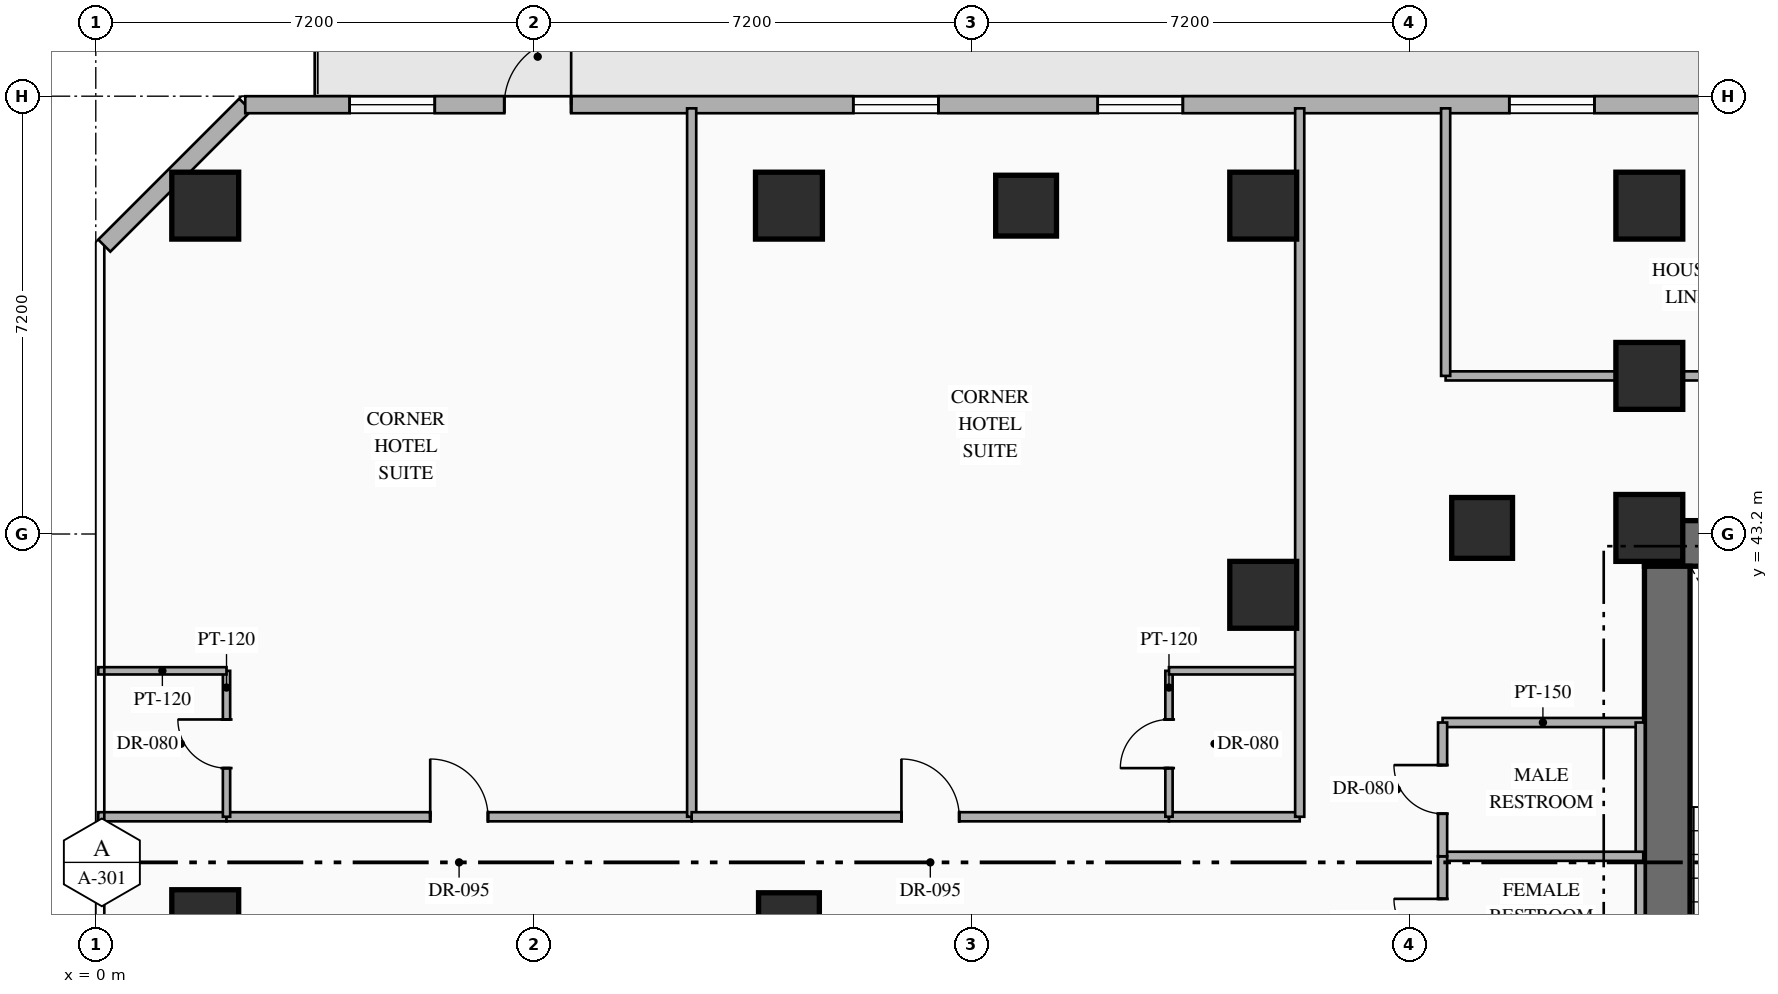
"""IFC4 building model, lengths in metres.
Left out: names, types, materials, properties, quantities, classifications, styles, units other than length and angle.
Written with IfcOpenShell. Run it as: python <this file> out.ifc"""

import sys

from ifc_helpers import new_model, si_unit, direction, frame, frame_2d, origin, origin_2d, place, context, subcontext, project, spatial, rectangle, hollow_rectangle, extrude, element, fill, save


model = new_model("IFC4")
c1 = context("Model", 3, precision=1e-05, world=origin(), true_north=direction((0.0, 1.0)))
c2 = subcontext(c1, "Body", "Model", "MODEL_VIEW")
j1 = project(units=[si_unit("LENGTHUNIT", "METRE"), si_unit("PLANEANGLEUNIT", "RADIAN")], contexts=[c1])
p1 = place(None, origin())
s1 = spatial("IfcSite", under=j1, at=p1, CompositionType="ELEMENT")
p2 = place(p1, origin())
s2 = spatial("IfcBuilding", under=s1, at=p2, CompositionType="ELEMENT")
p3 = place(p2, frame((0.0, 0.0, 66.75)))
s3 = spatial("IfcBuildingStorey", under=s2, at=p3, CompositionType="ELEMENT", Elevation=66.75)
p4 = place(p3, frame((25.47, 43.045, 0.0), z_axis=(0.0, 0.0, 1.0), x_axis=(1.0, 0.0, 0.0)))
e1 = element("IfcWall", 1, at=p4, inside=s3, PredefinedType="SHEAR", context=c2, shape_type="SweptSolid", body=[
    extrude(rectangle(XDim=8.08, YDim=0.75, at=frame_2d((4.04, 0.0))), origin(), (0.0, 0.0, 1.0), 3.35),
])
p5 = place(p3, frame((25.845, 33.19, 0.0), z_axis=(0.0, 0.0, 1.0), x_axis=(0.0, 1.0, 0.0)))
e2 = element("IfcWall", 2, at=p5, inside=s3, PredefinedType="SHEAR", context=c2, shape_type="SweptSolid", body=[
    extrude(rectangle(XDim=9.48, YDim=0.75, at=frame_2d((4.74, 0.0))), origin(), (0.0, 0.0, 1.0), 3.35),
])
p6 = place(p3, frame((25.55, 43.3, 0.0), z_axis=(0.0, 0.0, 1.0), x_axis=(1.0, 0.0, 0.0)))
e3 = element("IfcColumn", 3, at=p6, inside=s3, PredefinedType="COLUMN", context=c2, shape_type="SweptSolid", body=[
    extrude(rectangle(XDim=1.1, YDim=1.1, at=origin_2d()), origin(), (0.0, 0.0, 1.0), 3.35),
])
p7 = place(p3, frame((25.55, 45.8, 0.0), z_axis=(0.0, 0.0, 1.0), x_axis=(1.0, 0.0, 0.0)))
e4 = element("IfcColumn", 4, at=p7, inside=s3, PredefinedType="COLUMN", context=c2, shape_type="SweptSolid", body=[
    extrude(hollow_rectangle(XDim=1.1, YDim=1.1, WallThickness=0.04, at=origin_2d()), origin(), (0.0, 0.0, 1.0), 3.35),
])
for number, where, z_axis, x_axis in (
    (5, (1.8, 48.6, 0.0), (0.0, 0.0, 1.0), (1.0, 0.0, 0.0)),
    (6, (1.8, 36.8, 0.0), (0.0, 0.0, 1.0), (1.0, 0.0, 0.0)),
):
    element("IfcColumn", number, at=place(p3, frame(where, z_axis=z_axis, x_axis=x_axis)), inside=s3, PredefinedType="COLUMN", context=c2, shape_type="SweptSolid", body=[
        extrude(hollow_rectangle(XDim=1.1, YDim=1.1, WallThickness=0.04, at=origin_2d()), origin(), (0.0, 0.0, 1.0), 3.098),
    ])
for number, where, z_axis, x_axis in (
    (7, (11.4, 48.6, 0.0), (0.0, 0.0, 1.0), (1.0, 0.0, 0.0)),
    (8, (19.2, 48.6, 0.0), (0.0, 0.0, 1.0), (1.0, 0.0, 0.0)),
    (9, (25.55, 48.6, 0.0), (0.0, 0.0, 1.0), (1.0, 0.0, 0.0)),
    (10, (19.2, 42.2, 0.0), (0.0, 0.0, 1.0), (1.0, 0.0, 0.0)),
):
    element("IfcColumn", number, at=place(p3, frame(where, z_axis=z_axis, x_axis=x_axis)), inside=s3, PredefinedType="COLUMN", context=c2, shape_type="SweptSolid", body=[
        extrude(hollow_rectangle(XDim=1.1, YDim=1.1, WallThickness=0.04, at=origin_2d()), origin(), (0.0, 0.0, 1.0), 3.35),
    ])
for number, where, z_axis, x_axis in (
    (11, (22.8, 43.3, 0.0), (0.0, 0.0, 1.0), (1.0, 0.0, 0.0)),
    (12, (11.4, 36.8, 0.0), (0.0, 0.0, 1.0), (1.0, 0.0, 0.0)),
    (13, (15.3, 48.6, 0.0), (0.0, 0.0, 1.0), (1.0, 0.0, 0.0)),
):
    element("IfcColumn", number, at=place(p3, frame(where, z_axis=z_axis, x_axis=x_axis)), inside=s3, PredefinedType="COLUMN", context=c2, shape_type="SweptSolid", body=[
        extrude(hollow_rectangle(XDim=1.0, YDim=1.0, WallThickness=0.038, at=origin_2d()), origin(), (0.0, 0.0, 1.0), 3.35),
    ])
p8 = place(p3, frame((0.14, 47.942, 0.0), z_axis=(0.0, 0.0, 1.0), x_axis=(0.707106781187, 0.707106781187, 0.0)))
e14 = element("IfcWall", 14, at=p8, inside=s3, PredefinedType="STANDARD", context=c2, shape_type="SweptSolid", body=[
    extrude(rectangle(XDim=3.278, YDim=0.28, at=frame_2d((1.639, 0.0))), origin(), (0.0, 0.0, 1.0), 3.09),
])
p9 = place(p3, frame((2.458, 50.26, 0.0), z_axis=(0.0, 0.0, 1.0), x_axis=(1.0, 0.0, 0.0)))
e15 = element("IfcWall", 15, at=p9, inside=s3, PredefinedType="STANDARD", context=c2, shape_type="SweptSolid", body=[
    extrude(rectangle(XDim=40.084, YDim=0.28, at=frame_2d((20.042, 0.0))), origin(), (0.0, 0.0, 1.0), 3.09),
])
p10 = place(p9, frame((4.26, 0.0, 0.0)))
e16 = element("IfcOpeningElement", 16, at=p10, cuts=e15, PredefinedType="OPENING", context=c2, shape_type="SweptSolid", body=[
    extrude(rectangle(XDim=1.1, YDim=2.2, at=frame_2d((0.55, 1.1))), frame((0.0, 0.15, 0.0), z_axis=(0.0, -1.0, 0.0), x_axis=(1.0, 0.0, 0.0)), (0.0, 0.0, 1.0), 0.3),
])
p11 = place(p9, frame((1.717, 0.0, 0.85)))
e17 = element("IfcOpeningElement", 17, at=p11, cuts=e15, PredefinedType="OPENING", context=c2, shape_type="SweptSolid", body=[
    extrude(rectangle(XDim=1.4, YDim=1.8, at=frame_2d((0.7, 0.9))), frame((0.0, 0.15, 0.0), z_axis=(0.0, -1.0, 0.0), x_axis=(1.0, 0.0, 0.0)), (0.0, 0.0, 1.0), 0.3),
])
p12 = place(p9, frame((10.0, 0.0, 0.85)))
e18 = element("IfcOpeningElement", 18, at=p12, cuts=e15, PredefinedType="OPENING", context=c2, shape_type="SweptSolid", body=[
    extrude(rectangle(XDim=1.4, YDim=1.8, at=frame_2d((0.7, 0.9))), frame((0.0, 0.15, 0.0), z_axis=(0.0, -1.0, 0.0), x_axis=(1.0, 0.0, 0.0)), (0.0, 0.0, 1.0), 0.3),
])
p13 = place(p9, frame((14.02, 0.0, 0.85)))
e19 = element("IfcOpeningElement", 19, at=p13, cuts=e15, PredefinedType="OPENING", context=c2, shape_type="SweptSolid", body=[
    extrude(rectangle(XDim=1.4, YDim=1.8, at=frame_2d((0.7, 0.9))), frame((0.0, 0.15, 0.0), z_axis=(0.0, -1.0, 0.0), x_axis=(1.0, 0.0, 0.0)), (0.0, 0.0, 1.0), 0.3),
])
p14 = place(p9, frame((20.789, 0.0, 0.85)))
e20 = element("IfcOpeningElement", 20, at=p14, cuts=e15, PredefinedType="OPENING", context=c2, shape_type="SweptSolid", body=[
    extrude(rectangle(XDim=1.4, YDim=1.8, at=frame_2d((0.7, 0.9))), frame((0.0, 0.15, 0.0), z_axis=(0.0, -1.0, 0.0), x_axis=(1.0, 0.0, 0.0)), (0.0, 0.0, 1.0), 0.3),
])
p15 = place(p9, frame((24.664, 0.0, 0.85)))
e21 = element("IfcOpeningElement", 21, at=p15, cuts=e15, PredefinedType="OPENING", context=c2, shape_type="SweptSolid", body=[
    extrude(rectangle(XDim=1.4, YDim=1.8, at=frame_2d((0.7, 0.9))), frame((0.0, 0.15, 0.0), z_axis=(0.0, -1.0, 0.0), x_axis=(1.0, 0.0, 0.0)), (0.0, 0.0, 1.0), 0.3),
])
p16 = place(p9, frame((26.803, 0.0, 0.85)))
e22 = element("IfcOpeningElement", 22, at=p16, cuts=e15, PredefinedType="OPENING", context=c2, shape_type="SweptSolid", body=[
    extrude(rectangle(XDim=1.4, YDim=1.8, at=frame_2d((0.7, 0.9))), frame((0.0, 0.15, 0.0), z_axis=(0.0, -1.0, 0.0), x_axis=(1.0, 0.0, 0.0)), (0.0, 0.0, 1.0), 0.3),
])
p17 = place(p9, frame((32.703, 0.0, 0.85)))
e23 = element("IfcOpeningElement", 23, at=p17, cuts=e15, PredefinedType="OPENING", context=c2, shape_type="SweptSolid", body=[
    extrude(rectangle(XDim=1.4, YDim=1.8, at=frame_2d((0.7, 0.9))), frame((0.0, 0.15, 0.0), z_axis=(0.0, -1.0, 0.0), x_axis=(1.0, 0.0, 0.0)), (0.0, 0.0, 1.0), 0.3),
])
p18 = place(p9, frame((36.967, 0.0, 0.85)))
e24 = element("IfcOpeningElement", 24, at=p18, cuts=e15, PredefinedType="OPENING", context=c2, shape_type="SweptSolid", body=[
    extrude(rectangle(XDim=1.4, YDim=1.8, at=frame_2d((0.7, 0.9))), frame((0.0, 0.15, 0.0), z_axis=(0.0, -1.0, 0.0), x_axis=(1.0, 0.0, 0.0)), (0.0, 0.0, 1.0), 0.3),
])
p19 = place(p3, frame((22.15, 40.1, 0.0), z_axis=(0.0, 0.0, 1.0), x_axis=(1.0, 0.0, 0.0)))
e25 = element("IfcWall", 25, at=p19, inside=s3, PredefinedType="PARTITIONING", context=c2, shape_type="SweptSolid", body=[
    extrude(rectangle(XDim=3.3, YDim=0.15, at=frame_2d((1.65, 0.0))), origin(), (0.0, 0.0, 1.0), 3.09),
])
p20 = place(p3, frame((25.4, 33.5, 0.0), z_axis=(0.0, 0.0, 1.0), x_axis=(0.0, 1.0, 0.0)))
e26 = element("IfcWall", 26, at=p20, inside=s3, PredefinedType="PARTITIONING", context=c2, shape_type="SweptSolid", body=[
    extrude(rectangle(XDim=6.6, YDim=0.15, at=frame_2d((3.3, 0.0))), origin(), (0.0, 0.0, 1.0), 3.09),
])
p21 = place(p3, frame((22.15, 37.9, 0.0), z_axis=(0.0, 0.0, 1.0), x_axis=(1.0, 0.0, 0.0)))
e27 = element("IfcWall", 27, at=p21, inside=s3, PredefinedType="PARTITIONING", context=c2, shape_type="SweptSolid", body=[
    extrude(rectangle(XDim=3.3, YDim=0.15, at=frame_2d((1.65, 0.0))), origin(), (0.0, 0.0, 1.0), 3.09),
])
p22 = place(p3, frame((22.15, 35.7, 0.0), z_axis=(0.0, 0.0, 1.0), x_axis=(0.0, 1.0, 0.0)))
e28 = element("IfcWall", 28, at=p22, inside=s3, PredefinedType="PARTITIONING", context=c2, shape_type="SweptSolid", body=[
    extrude(rectangle(XDim=2.2, YDim=0.15, at=frame_2d((1.1, 0.0))), origin(), (0.0, 0.0, 1.0), 3.09),
])
p23 = place(p22, frame((0.7, 0.0, 0.0)))
e29 = element("IfcOpeningElement", 29, at=p23, cuts=e28, PredefinedType="OPENING", context=c2, shape_type="SweptSolid", body=[
    extrude(rectangle(XDim=0.8, YDim=2.06, at=frame_2d((0.4, 1.03))), frame((0.0, 0.085, 0.0), z_axis=(0.0, -1.0, 0.0), x_axis=(1.0, 0.0, 0.0)), (0.0, 0.0, 1.0), 0.17),
])
p24 = place(p3, frame((22.15, 37.9, 0.0), z_axis=(0.0, 0.0, 1.0), x_axis=(0.0, 1.0, 0.0)))
e30 = element("IfcWall", 30, at=p24, inside=s3, PredefinedType="PARTITIONING", context=c2, shape_type="SweptSolid", body=[
    extrude(rectangle(XDim=2.2, YDim=0.15, at=frame_2d((1.1, 0.0))), origin(), (0.0, 0.0, 1.0), 3.09),
])
p25 = place(p24, frame((0.7, 0.0, 0.0)))
e31 = element("IfcOpeningElement", 31, at=p25, cuts=e30, PredefinedType="OPENING", context=c2, shape_type="SweptSolid", body=[
    extrude(rectangle(XDim=0.8, YDim=2.06, at=frame_2d((0.4, 1.03))), frame((0.0, 0.085, 0.0), z_axis=(0.0, -1.0, 0.0), x_axis=(1.0, 0.0, 0.0)), (0.0, 0.0, 1.0), 0.17),
])
p26 = place(p3, frame((22.2, 45.8, 0.0), z_axis=(0.0, 0.0, 1.0), x_axis=(1.0, 0.0, 0.0)))
e32 = element("IfcWall", 32, at=p26, inside=s3, PredefinedType="PARTITIONING", context=c2, shape_type="SweptSolid", body=[
    extrude(rectangle(XDim=9.2, YDim=0.15, at=frame_2d((4.6, 0.0))), origin(), (0.0, 0.0, 1.0), 2.425),
])
p27 = place(p26, frame((5.248, 0.0, 0.0)))
e33 = element("IfcOpeningElement", 33, at=p27, cuts=e32, PredefinedType="OPENING", context=c2, shape_type="SweptSolid", body=[
    extrude(rectangle(XDim=0.95, YDim=2.15, at=frame_2d((0.475, 1.075))), frame((0.0, 0.085, 0.0), z_axis=(0.0, -1.0, 0.0), x_axis=(1.0, 0.0, 0.0)), (0.0, 0.0, 1.0), 0.17),
])
p28 = place(p3, frame((22.2, 45.8, 0.0), z_axis=(0.0, 0.0, 1.0), x_axis=(0.0, 1.0, 0.0)))
e34 = element("IfcWall", 34, at=p28, inside=s3, PredefinedType="PARTITIONING", context=c2, shape_type="SweptSolid", body=[
    extrude(rectangle(XDim=4.4, YDim=0.15, at=frame_2d((2.2, 0.0))), origin(), (0.0, 0.0, 1.0), 3.09),
])
p29 = place(p3, frame((0.04, 38.55, 0.0), z_axis=(0.0, 0.0, 1.0), x_axis=(1.0, 0.0, 0.0)))
e35 = element("IfcWall", 35, at=p29, inside=s3, PredefinedType="PARTITIONING", context=c2, shape_type="SweptSolid", body=[
    extrude(rectangle(XDim=2.11, YDim=0.15, at=frame_2d((1.055, 0.0))), origin(), (0.0, 0.0, 1.0), 2.775),
])
p30 = place(p3, frame((2.15, 38.55, 0.0), z_axis=(0.0, 0.0, 1.0), x_axis=(1.0, 0.0, 0.0)))
e36 = element("IfcWall", 36, at=p30, inside=s3, PredefinedType="PARTITIONING", context=c2, shape_type="SweptSolid", body=[
    extrude(rectangle(XDim=7.65, YDim=0.15, at=frame_2d((3.825, 0.0))), origin(), (0.0, 0.0, 1.0), 2.775),
])
p31 = place(p30, frame((3.35, 0.0, 0.0)))
e37 = element("IfcOpeningElement", 37, at=p31, cuts=e36, PredefinedType="OPENING", context=c2, shape_type="SweptSolid", body=[
    extrude(rectangle(XDim=0.95, YDim=2.15, at=frame_2d((0.475, 1.075))), frame((0.0, 0.085, 0.0), z_axis=(0.0, -1.0, 0.0), x_axis=(1.0, 0.0, 0.0)), (0.0, 0.0, 1.0), 0.17),
])
p32 = place(p3, frame((2.15, 38.55, 0.0), z_axis=(0.0, 0.0, 1.0), x_axis=(0.0, 1.0, 0.0)))
e38 = element("IfcWall", 38, at=p32, inside=s3, PredefinedType="PARTITIONING", context=c2, shape_type="SweptSolid", body=[
    extrude(rectangle(XDim=2.4, YDim=0.12, at=frame_2d((1.2, 0.0))), origin(), (0.0, 0.0, 1.0), 3.09),
])
p33 = place(p32, frame((0.8, 0.0, 0.0)))
e39 = element("IfcOpeningElement", 39, at=p33, cuts=e38, PredefinedType="OPENING", context=c2, shape_type="SweptSolid", body=[
    extrude(rectangle(XDim=0.8, YDim=2.06, at=frame_2d((0.4, 1.03))), frame((0.0, 0.07, 0.0), z_axis=(0.0, -1.0, 0.0), x_axis=(1.0, 0.0, 0.0)), (0.0, 0.0, 1.0), 0.14),
])
p34 = place(p3, frame((0.04, 40.95, 0.0), z_axis=(0.0, 0.0, 1.0), x_axis=(1.0, 0.0, 0.0)))
e40 = element("IfcWall", 40, at=p34, inside=s3, PredefinedType="PARTITIONING", context=c2, shape_type="SweptSolid", body=[
    extrude(rectangle(XDim=2.11, YDim=0.12, at=frame_2d((1.055, 0.0))), origin(), (0.0, 0.0, 1.0), 2.775),
])
p35 = place(p3, frame((9.8, 38.55, 0.0), z_axis=(0.0, 0.0, 1.0), x_axis=(0.0, 1.0, 0.0)))
e41 = element("IfcWall", 41, at=p35, inside=s3, PredefinedType="PARTITIONING", context=c2, shape_type="SweptSolid", body=[
    extrude(rectangle(XDim=11.65, YDim=0.15, at=frame_2d((5.825, 0.0))), origin(), (0.0, 0.0, 1.0), 3.09),
])
p36 = place(p3, frame((9.8, 38.55, 0.0), z_axis=(0.0, 0.0, 1.0), x_axis=(1.0, 0.0, 0.0)))
e42 = element("IfcWall", 42, at=p36, inside=s3, PredefinedType="PARTITIONING", context=c2, shape_type="SweptSolid", body=[
    extrude(rectangle(XDim=7.85, YDim=0.15, at=frame_2d((3.925, 0.0))), origin(), (0.0, 0.0, 1.0), 2.775),
])
p37 = place(p36, frame((3.45, 0.0, 0.0)))
e43 = element("IfcOpeningElement", 43, at=p37, cuts=e42, PredefinedType="OPENING", context=c2, shape_type="SweptSolid", body=[
    extrude(rectangle(XDim=0.95, YDim=2.15, at=frame_2d((0.475, 1.075))), frame((0.0, 0.085, 0.0), z_axis=(0.0, -1.0, 0.0), x_axis=(1.0, 0.0, 0.0)), (0.0, 0.0, 1.0), 0.17),
])
p38 = place(p3, frame((17.65, 38.55, 0.0), z_axis=(0.0, 0.0, 1.0), x_axis=(1.0, 0.0, 0.0)))
e44 = element("IfcWall", 44, at=p38, inside=s3, PredefinedType="PARTITIONING", context=c2, shape_type="SweptSolid", body=[
    extrude(rectangle(XDim=2.15, YDim=0.15, at=frame_2d((1.075, 0.0))), origin(), (0.0, 0.0, 1.0), 2.775),
])
p39 = place(p3, frame((17.65, 38.55, 0.0), z_axis=(0.0, 0.0, 1.0), x_axis=(0.0, 1.0, 0.0)))
e45 = element("IfcWall", 45, at=p39, inside=s3, PredefinedType="PARTITIONING", context=c2, shape_type="SweptSolid", body=[
    extrude(rectangle(XDim=2.4, YDim=0.12, at=frame_2d((1.2, 0.0))), origin(), (0.0, 0.0, 1.0), 3.09),
])
p40 = place(p39, frame((0.8, 0.0, 0.0)))
e46 = element("IfcOpeningElement", 46, at=p40, cuts=e45, PredefinedType="OPENING", context=c2, shape_type="SweptSolid", body=[
    extrude(rectangle(XDim=0.8, YDim=2.06, at=frame_2d((0.4, 1.03))), frame((0.0, 0.07, 0.0), z_axis=(0.0, -1.0, 0.0), x_axis=(1.0, 0.0, 0.0)), (0.0, 0.0, 1.0), 0.14),
])
p41 = place(p3, frame((17.65, 40.95, 0.0), z_axis=(0.0, 0.0, 1.0), x_axis=(1.0, 0.0, 0.0)))
e47 = element("IfcWall", 47, at=p41, inside=s3, PredefinedType="PARTITIONING", context=c2, shape_type="SweptSolid", body=[
    extrude(rectangle(XDim=2.15, YDim=0.12, at=frame_2d((1.075, 0.0))), origin(), (0.0, 0.0, 1.0), 2.775),
])
p42 = place(p3, frame((19.8, 38.55, 0.0), z_axis=(0.0, 0.0, 1.0), x_axis=(0.0, 1.0, 0.0)))
e48 = element("IfcWall", 48, at=p42, inside=s3, PredefinedType="PARTITIONING", context=c2, shape_type="SweptSolid", body=[
    extrude(rectangle(XDim=11.65, YDim=0.15, at=frame_2d((5.825, 0.0))), origin(), (0.0, 0.0, 1.0), 3.09),
])
p43 = place(p10, origin())
e49 = element("IfcDoor", 49, at=p43, inside=s3, OperationType="SINGLE_SWING_RIGHT", PredefinedType="DOOR", context=c2, shape_type="SweptSolid", body=[
    extrude(rectangle(XDim=1.1, YDim=2.2, at=frame_2d((0.55, 1.1))), frame((0.0, 0.025, 0.0), z_axis=(0.0, -1.0, 0.0), x_axis=(1.0, 0.0, 0.0)), (0.0, 0.0, 1.0), 0.05),
])
fill(e16, e49)
p44 = place(p11, origin())
e50 = element("IfcWindow", 50, at=p44, inside=s3, PartitioningType="SINGLE_PANEL", PredefinedType="WINDOW", context=c2, shape_type="SweptSolid", body=[
    extrude(rectangle(XDim=1.4, YDim=1.8, at=frame_2d((0.7, 0.9))), frame((0.0, 0.03, 0.0), z_axis=(0.0, -1.0, 0.0), x_axis=(1.0, 0.0, 0.0)), (0.0, 0.0, 1.0), 0.06),
])
fill(e17, e50)
p45 = place(p12, origin())
e51 = element("IfcWindow", 51, at=p45, inside=s3, PartitioningType="SINGLE_PANEL", PredefinedType="WINDOW", context=c2, shape_type="SweptSolid", body=[
    extrude(rectangle(XDim=1.4, YDim=1.8, at=frame_2d((0.7, 0.9))), frame((0.0, 0.03, 0.0), z_axis=(0.0, -1.0, 0.0), x_axis=(1.0, 0.0, 0.0)), (0.0, 0.0, 1.0), 0.06),
])
fill(e18, e51)
p46 = place(p13, origin())
e52 = element("IfcWindow", 52, at=p46, inside=s3, PartitioningType="SINGLE_PANEL", PredefinedType="WINDOW", context=c2, shape_type="SweptSolid", body=[
    extrude(rectangle(XDim=1.4, YDim=1.8, at=frame_2d((0.7, 0.9))), frame((0.0, 0.03, 0.0), z_axis=(0.0, -1.0, 0.0), x_axis=(1.0, 0.0, 0.0)), (0.0, 0.0, 1.0), 0.06),
])
fill(e19, e52)
p47 = place(p14, origin())
e53 = element("IfcWindow", 53, at=p47, inside=s3, PartitioningType="SINGLE_PANEL", PredefinedType="WINDOW", context=c2, shape_type="SweptSolid", body=[
    extrude(rectangle(XDim=1.4, YDim=1.8, at=frame_2d((0.7, 0.9))), frame((0.0, 0.03, 0.0), z_axis=(0.0, -1.0, 0.0), x_axis=(1.0, 0.0, 0.0)), (0.0, 0.0, 1.0), 0.06),
])
fill(e20, e53)
p48 = place(p23, origin())
e54 = element("IfcDoor", 54, at=p48, inside=s3, OperationType="SINGLE_SWING_RIGHT", PredefinedType="DOOR", context=c2, shape_type="SweptSolid", body=[
    extrude(rectangle(XDim=0.8, YDim=2.06, at=frame_2d((0.4, 1.03))), frame((0.0, 0.025, 0.0), z_axis=(0.0, -1.0, 0.0), x_axis=(1.0, 0.0, 0.0)), (0.0, 0.0, 1.0), 0.05),
])
fill(e29, e54)
p49 = place(p25, origin())
e55 = element("IfcDoor", 55, at=p49, inside=s3, OperationType="SINGLE_SWING_RIGHT", PredefinedType="DOOR", context=c2, shape_type="SweptSolid", body=[
    extrude(rectangle(XDim=0.8, YDim=2.06, at=frame_2d((0.4, 1.03))), frame((0.0, 0.025, 0.0), z_axis=(0.0, -1.0, 0.0), x_axis=(1.0, 0.0, 0.0)), (0.0, 0.0, 1.0), 0.05),
])
fill(e31, e55)
p50 = place(p31, origin())
e56 = element("IfcDoor", 56, at=p50, inside=s3, OperationType="SINGLE_SWING_LEFT", PredefinedType="DOOR", context=c2, shape_type="SweptSolid", body=[
    extrude(rectangle(XDim=0.95, YDim=2.15, at=frame_2d((0.475, 1.075))), frame((0.0, 0.025, 0.0), z_axis=(0.0, -1.0, 0.0), x_axis=(1.0, 0.0, 0.0)), (0.0, 0.0, 1.0), 0.05),
])
fill(e37, e56)
p51 = place(p33, origin())
e57 = element("IfcDoor", 57, at=p51, inside=s3, OperationType="SINGLE_SWING_RIGHT", PredefinedType="DOOR", context=c2, shape_type="SweptSolid", body=[
    extrude(rectangle(XDim=0.8, YDim=2.06, at=frame_2d((0.4, 1.03))), frame((0.0, 0.025, 0.0), z_axis=(0.0, -1.0, 0.0), x_axis=(1.0, 0.0, 0.0)), (0.0, 0.0, 1.0), 0.05),
])
fill(e39, e57)
p52 = place(p37, origin())
e58 = element("IfcDoor", 58, at=p52, inside=s3, OperationType="SINGLE_SWING_LEFT", PredefinedType="DOOR", context=c2, shape_type="SweptSolid", body=[
    extrude(rectangle(XDim=0.95, YDim=2.15, at=frame_2d((0.475, 1.075))), frame((0.0, 0.025, 0.0), z_axis=(0.0, -1.0, 0.0), x_axis=(1.0, 0.0, 0.0)), (0.0, 0.0, 1.0), 0.05),
])
fill(e43, e58)
p53 = place(p40, origin())
e59 = element("IfcDoor", 59, at=p53, inside=s3, OperationType="SINGLE_SWING_LEFT", PredefinedType="DOOR", context=c2, shape_type="SweptSolid", body=[
    extrude(rectangle(XDim=0.8, YDim=2.06, at=frame_2d((0.4, 1.03))), frame((0.0, 0.025, 0.0), z_axis=(0.0, -1.0, 0.0), x_axis=(1.0, 0.0, 0.0)), (0.0, 0.0, 1.0), 0.05),
])
fill(e46, e59)
save(model, sys.argv[1])
